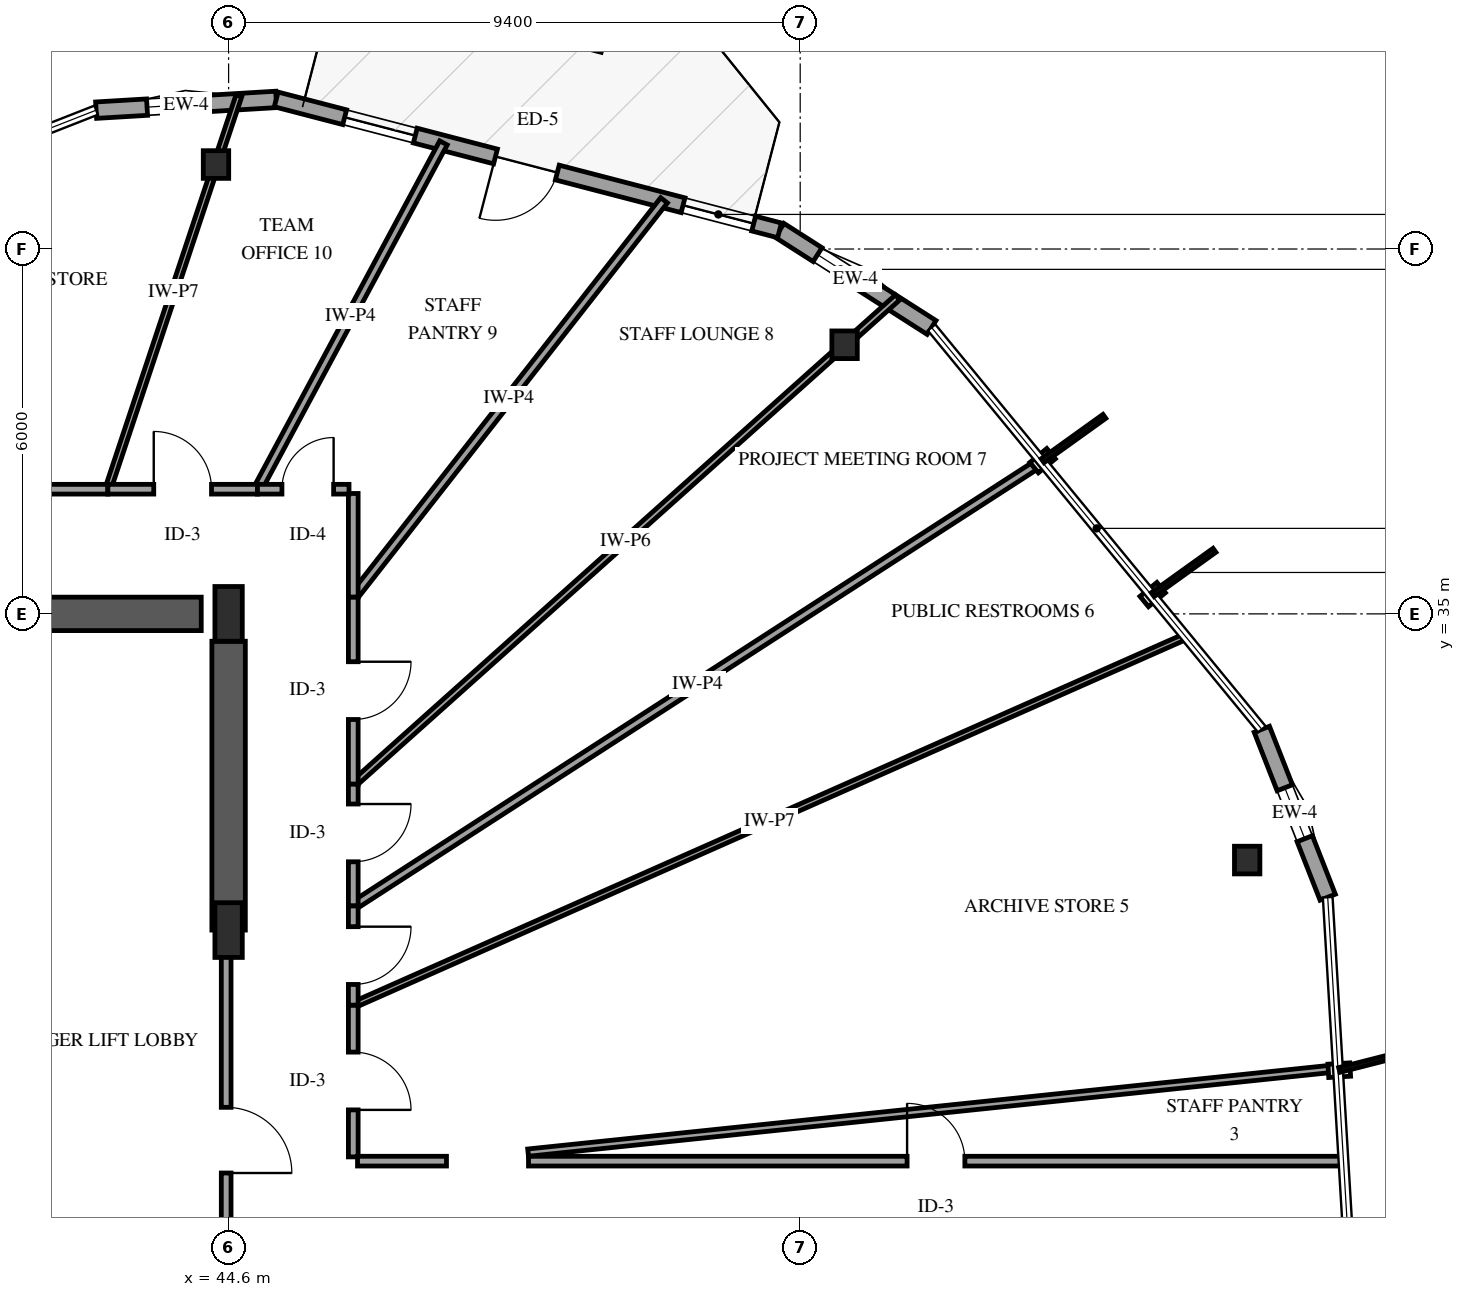
"""IFC4 building model, lengths in metres.
Left out: names, types, materials, properties, quantities, classifications, styles, units other than length and angle.
Written with IfcOpenShell. Run it as: python <this file> out.ifc"""

import sys

from ifc_helpers import new_model, si_unit, direction, frame, frame_2d, origin, origin_2d, place, context, subcontext, project, spatial, rectangle, i_section, extrude, element, fill, save


model = new_model("IFC4")
c1 = context("Model", 3, precision=1e-05, world=origin(), true_north=direction((0.0, 1.0)))
c2 = subcontext(c1, "Body", "Model", "MODEL_VIEW")
j1 = project(units=[si_unit("LENGTHUNIT", "METRE"), si_unit("PLANEANGLEUNIT", "RADIAN")], contexts=[c1])
p1 = place(None, origin())
s1 = spatial("IfcSite", under=j1, at=p1, CompositionType="ELEMENT")
p2 = place(p1, origin())
s2 = spatial("IfcBuilding", under=s1, at=p2, CompositionType="ELEMENT")
p3 = place(p2, frame((0.0, 0.0, 110.8)))
s3 = spatial("IfcBuildingStorey", under=s2, at=p3, CompositionType="ELEMENT", Elevation=110.8)
p4 = place(p3, frame((41.3, 35.0, 0.0), z_axis=(0.0, 0.0, 1.0), x_axis=(1.0, 0.0, 0.0)))
e1 = element("IfcWall", 1, at=p4, inside=s3, PredefinedType="SHEAR", context=c2, shape_type="SweptSolid", body=[
    extrude(rectangle(XDim=2.85, YDim=0.55, at=frame_2d((1.425, 0.0))), origin(), (0.0, 0.0, 1.0), 3.9),
])
p5 = place(p3, frame((44.6, 29.8, 0.0), z_axis=(0.0, 0.0, 1.0), x_axis=(0.0, 1.0, 0.0)))
e2 = element("IfcWall", 2, at=p5, inside=s3, PredefinedType="SHEAR", context=c2, shape_type="SweptSolid", body=[
    extrude(rectangle(XDim=4.75, YDim=0.55, at=frame_2d((2.375, 0.0))), origin(), (0.0, 0.0, 1.0), 3.9),
])
for number, where, z_axis, x_axis in (
    (3, (44.6, 29.8, 0.0), (0.0, 0.0, 1.0), (1.0, 0.0, 0.0)),
    (4, (44.6, 35.0, 0.0), (0.0, 0.0, 1.0), (1.0, 0.0, 0.0)),
):
    element("IfcColumn", number, at=place(p3, frame(where, z_axis=z_axis, x_axis=x_axis)), inside=s3, PredefinedType="PILASTER", context=c2, shape_type="SweptSolid", body=[
        extrude(rectangle(XDim=0.45, YDim=0.9, at=origin_2d()), origin(), (0.0, 0.0, 1.0), 3.9),
    ])
for number, where, z_axis, x_axis in (
    (5, (61.351, 30.951, 0.0), (0.0, 0.0, 1.0), (1.0, 0.0, 0.0)),
    (6, (54.73, 39.425, 0.0), (0.0, 0.0, 1.0), (1.0, 0.0, 0.0)),
    (7, (44.393, 42.389, 0.0), (0.0, 0.0, 1.0), (1.0, 0.0, 0.0)),
):
    element("IfcColumn", number, at=place(p3, frame(where, z_axis=z_axis, x_axis=x_axis)), inside=s3, PredefinedType="COLUMN", context=c2, shape_type="SweptSolid", body=[
        extrude(i_section(OverallWidth=0.418, OverallDepth=0.455, WebThickness=0.042, FlangeThickness=0.068, FilletRadius=0.038, at=origin_2d()), origin(), (0.0, 0.0, 1.0), 3.9),
    ])
p6 = place(p3, frame((56.16, 39.71, 0.0), z_axis=(0.0, 0.0, 1.0), x_axis=(-0.842667219755, 0.538434728404, 0.0)))
e8 = element("IfcWall", 8, at=p6, inside=s3, PredefinedType="SOLIDWALL", context=c2, shape_type="SweptSolid", body=[
    extrude(rectangle(XDim=2.967, YDim=0.27, at=frame_2d((1.483, 0.0))), origin(), (0.0, 0.0, 1.0), 2.979),
])
p7 = place(p6, frame((1.325, 0.0, 0.75)))
e9 = element("IfcOpeningElement", 9, at=p7, cuts=e8, PredefinedType="OPENING", context=c2, shape_type="SweptSolid", body=[
    extrude(rectangle(XDim=0.9, YDim=1.5, at=frame_2d((0.45, 0.75))), frame((0.0, 0.145, 0.0), z_axis=(0.0, -1.0, 0.0), x_axis=(1.0, 0.0, 0.0)), (0.0, 0.0, 1.0), 0.29),
])
p8 = place(p3, frame((45.383, 43.46, 0.0), z_axis=(0.0, 0.0, 1.0), x_axis=(-0.998218594755, -0.059662694245, 0.0)))
e10 = element("IfcWall", 10, at=p8, inside=s3, PredefinedType="SOLIDWALL", context=c2, shape_type="SweptSolid", body=[
    extrude(rectangle(XDim=2.967, YDim=0.27, at=frame_2d((1.483, 0.0))), origin(), (0.0, 0.0, 1.0), 2.979),
])
p9 = place(p8, frame((1.228, 0.0, 0.75)))
e11 = element("IfcOpeningElement", 11, at=p9, cuts=e10, PredefinedType="OPENING", context=c2, shape_type="SweptSolid", body=[
    extrude(rectangle(XDim=0.9, YDim=1.5, at=frame_2d((0.45, 0.75))), frame((0.0, 0.145, 0.0), z_axis=(0.0, -1.0, 0.0), x_axis=(1.0, 0.0, 0.0)), (0.0, 0.0, 1.0), 0.29),
])
p10 = place(p3, frame((53.66, 41.307, 0.0), z_axis=(0.0, 0.0, 1.0), x_axis=(-0.967796780787, 0.251732777164, 0.0)))
e12 = element("IfcWall", 12, at=p10, inside=s3, PredefinedType="SOLIDWALL", context=c2, shape_type="SweptSolid", body=[
    extrude(rectangle(XDim=8.553, YDim=0.25, at=frame_2d((4.276, 0.0))), origin(), (0.0, 0.0, 1.0), 2.979),
])
p11 = place(p10, frame((3.777, 0.0, 0.0)))
e13 = element("IfcOpeningElement", 13, at=p11, cuts=e12, PredefinedType="OPENING", context=c2, shape_type="SweptSolid", body=[
    extrude(rectangle(XDim=1.05, YDim=2.15, at=frame_2d((0.525, 1.075))), frame((0.0, 0.135, 0.0), z_axis=(0.0, -1.0, 0.0), x_axis=(1.0, 0.0, 0.0)), (0.0, 0.0, 1.0), 0.27),
])
p12 = place(p10, frame((0.44, 0.0, 0.72)))
e14 = element("IfcOpeningElement", 14, at=p12, cuts=e12, PredefinedType="OPENING", context=c2, shape_type="SweptSolid", body=[
    extrude(rectangle(XDim=1.2, YDim=1.6, at=frame_2d((0.6, 0.8))), frame((0.0, 0.135, 0.0), z_axis=(0.0, -1.0, 0.0), x_axis=(1.0, 0.0, 0.0)), (0.0, 0.0, 1.0), 0.27),
])
p13 = place(p10, frame((6.19, 0.0, 0.72)))
e15 = element("IfcOpeningElement", 15, at=p13, cuts=e12, PredefinedType="OPENING", context=c2, shape_type="SweptSolid", body=[
    extrude(rectangle(XDim=1.2, YDim=1.6, at=frame_2d((0.6, 0.8))), frame((0.0, 0.135, 0.0), z_axis=(0.0, -1.0, 0.0), x_axis=(1.0, 0.0, 0.0)), (0.0, 0.0, 1.0), 0.27),
])
p14 = place(p3, frame((62.675, 30.341, 0.0), z_axis=(0.0, 0.0, 1.0), x_axis=(-0.365224582411, 0.93091944034, 0.0)))
e16 = element("IfcWall", 16, at=p14, inside=s3, PredefinedType="SOLIDWALL", context=c2, shape_type="SweptSolid", body=[
    extrude(rectangle(XDim=2.967, YDim=0.27, at=frame_2d((1.483, 0.0))), origin(), (0.0, 0.0, 1.0), 2.979),
])
p15 = place(p14, frame((1.033, 0.0, 0.75)))
e17 = element("IfcOpeningElement", 17, at=p15, cuts=e16, PredefinedType="OPENING", context=c2, shape_type="SweptSolid", body=[
    extrude(rectangle(XDim=0.9, YDim=1.5, at=frame_2d((0.45, 0.75))), frame((0.0, 0.145, 0.0), z_axis=(0.0, -1.0, 0.0), x_axis=(1.0, 0.0, 0.0)), (0.0, 0.0, 1.0), 0.29),
])
p16 = place(p3, frame((46.65, 28.566, 0.0), z_axis=(0.0, 0.0, 1.0), x_axis=(0.914344731644, 0.40493667618, 0.0)))
e18 = element("IfcWall", 18, at=p16, inside=s3, PredefinedType="PARTITIONING", context=c2, shape_type="SweptSolid", body=[
    extrude(rectangle(XDim=14.97, YDim=0.1, at=frame_2d((7.485, 0.0))), origin(), (0.0, 0.0, 1.0), 3.6),
])
p17 = place(p3, frame((46.65, 30.197, 0.0), z_axis=(0.0, 0.0, 1.0), x_axis=(0.840088397566, 0.542449522329, 0.0)))
e19 = element("IfcWall", 19, at=p17, inside=s3, PredefinedType="PARTITIONING", context=c2, shape_type="SweptSolid", body=[
    extrude(rectangle(XDim=13.476, YDim=0.14, at=frame_2d((6.738, 0.0))), origin(), (0.0, 0.0, 1.0), 3.6),
])
p18 = place(p3, frame((49.532, 26.0, 0.0), z_axis=(0.0, 0.0, 1.0), x_axis=(1.0, 0.0, 0.0)))
e20 = element("IfcWall", 20, at=p18, inside=s3, PredefinedType="PARTITIONING", context=c2, shape_type="SweptSolid", body=[
    extrude(rectangle(XDim=13.402, YDim=0.16, at=frame_2d((6.701, 0.0))), origin(), (0.0, 0.0, 1.0), 3.6),
])
p19 = place(p18, frame((6.226, 0.0, 0.0)))
e21 = element("IfcOpeningElement", 21, at=p19, cuts=e20, PredefinedType="OPENING", context=c2, shape_type="SweptSolid", body=[
    extrude(rectangle(XDim=0.95, YDim=2.15, at=frame_2d((0.475, 1.075))), frame((0.0, 0.09, 0.0), z_axis=(0.0, -1.0, 0.0), x_axis=(1.0, 0.0, 0.0)), (0.0, 0.0, 1.0), 0.18),
])
p20 = place(p3, frame((49.525, 26.14, 0.0), z_axis=(0.0, 0.0, 1.0), x_axis=(0.994604112438, 0.103743238433, 0.0)))
e22 = element("IfcWall", 22, at=p20, inside=s3, PredefinedType="PARTITIONING", context=c2, shape_type="SweptSolid", body=[
    extrude(rectangle(XDim=13.39, YDim=0.12, at=frame_2d((6.695, 0.0))), origin(), (0.0, 0.0, 1.0), 3.6),
])
p21 = place(p3, frame((46.65, 32.199, 0.0), z_axis=(0.0, 0.0, 1.0), x_axis=(0.745394943762, 0.666623115272, 0.0)))
e23 = element("IfcWall", 23, at=p21, inside=s3, PredefinedType="PARTITIONING", context=c2, shape_type="SweptSolid", body=[
    extrude(rectangle(XDim=12.01, YDim=0.11, at=frame_2d((6.005, 0.0))), origin(), (0.0, 0.0, 1.0), 2.978),
])
p22 = place(p3, frame((46.65, 35.277, 0.0), z_axis=(0.0, 0.0, 1.0), x_axis=(0.616712482875, 0.78718848662, 0.0)))
e24 = element("IfcWall", 24, at=p22, inside=s3, PredefinedType="PARTITIONING", context=c2, shape_type="SweptSolid", body=[
    extrude(rectangle(XDim=8.288, YDim=0.14, at=frame_2d((4.144, 0.0))), origin(), (0.0, 0.0, 1.0), 2.978),
])
p23 = place(p3, frame((44.56, 29.8, 0.0), z_axis=(0.0, 0.0, 1.0), x_axis=(0.0, -1.0, 0.0)))
e25 = element("IfcWall", 25, at=p23, inside=s3, PredefinedType="PARTITIONING", context=c2, shape_type="SweptSolid", body=[
    extrude(rectangle(XDim=6.91, YDim=0.16, at=frame_2d((3.455, 0.0))), origin(), (0.0, 0.0, 1.0), 2.64),
])
p24 = place(p23, frame((2.915, 0.0, 0.0)))
e26 = element("IfcOpeningElement", 26, at=p24, cuts=e25, PredefinedType="OPENING", context=c2, shape_type="SweptSolid", body=[
    extrude(rectangle(XDim=1.08, YDim=2.15, at=frame_2d((0.54, 1.075))), frame((0.0, 0.09, 0.0), z_axis=(0.0, -1.0, 0.0), x_axis=(1.0, 0.0, 0.0)), (0.0, 0.0, 1.0), 0.18),
])
p25 = place(p3, frame((42.614, 37.05, 0.0), z_axis=(0.0, 0.0, 1.0), x_axis=(0.316012953592, 0.948754875172, 0.0)))
e27 = element("IfcWall", 27, at=p25, inside=s3, PredefinedType="PARTITIONING", context=c2, shape_type="SweptSolid", body=[
    extrude(rectangle(XDim=6.819, YDim=0.1, at=frame_2d((3.41, 0.0))), origin(), (0.0, 0.0, 1.0), 2.895),
])
p26 = place(p3, frame((45.074, 37.05, 0.0), z_axis=(0.0, 0.0, 1.0), x_axis=(0.473201001123, 0.880954489481, 0.0)))
e28 = element("IfcWall", 28, at=p26, inside=s3, PredefinedType="PARTITIONING", context=c2, shape_type="SweptSolid", body=[
    extrude(rectangle(XDim=6.465, YDim=0.14, at=frame_2d((3.232, 0.0))), origin(), (0.0, 0.0, 1.0), 2.974),
])
p27 = place(p3, frame((38.324, 37.05, 0.0), z_axis=(0.0, 0.0, 1.0), x_axis=(1.0, 0.0, 0.0)))
e29 = element("IfcWall", 29, at=p27, inside=s3, PredefinedType="PARTITIONING", context=c2, shape_type="SweptSolid", body=[
    extrude(rectangle(XDim=4.29, YDim=0.16, at=frame_2d((2.145, 0.0))), origin(), (0.0, 0.0, 1.0), 3.6),
])
p28 = place(p27, frame((1.67, 0.0, 0.0)))
e30 = element("IfcOpeningElement", 30, at=p28, cuts=e29, PredefinedType="OPENING", context=c2, shape_type="SweptSolid", body=[
    extrude(rectangle(XDim=0.95, YDim=2.15, at=frame_2d((0.475, 1.075))), frame((0.0, 0.09, 0.0), z_axis=(0.0, -1.0, 0.0), x_axis=(1.0, 0.0, 0.0)), (0.0, 0.0, 1.0), 0.18),
])
p29 = place(p3, frame((46.65, 35.277, 0.0), z_axis=(0.0, 0.0, 1.0), x_axis=(0.0, -1.0, 0.0)))
e31 = element("IfcWall", 31, at=p29, inside=s3, PredefinedType="PARTITIONING", context=c2, shape_type="SweptSolid", body=[
    extrude(rectangle(XDim=3.078, YDim=0.16, at=frame_2d((1.539, 0.0))), origin(), (0.0, 0.0, 1.0), 3.6),
])
p30 = place(p29, frame((1.064, 0.0, 0.0)))
e32 = element("IfcOpeningElement", 32, at=p30, cuts=e31, PredefinedType="OPENING", context=c2, shape_type="SweptSolid", body=[
    extrude(rectangle(XDim=0.95, YDim=2.15, at=frame_2d((0.475, 1.075))), frame((0.0, 0.09, 0.0), z_axis=(0.0, -1.0, 0.0), x_axis=(1.0, 0.0, 0.0)), (0.0, 0.0, 1.0), 0.18),
])
p31 = place(p3, frame((46.65, 28.566, 0.0), z_axis=(0.0, 0.0, 1.0), x_axis=(0.0, -1.0, 0.0)))
e33 = element("IfcWall", 33, at=p31, inside=s3, PredefinedType="PARTITIONING", context=c2, shape_type="SweptSolid", body=[
    extrude(rectangle(XDim=2.496, YDim=0.16, at=frame_2d((1.248, 0.0))), origin(), (0.0, 0.0, 1.0), 3.6),
])
p32 = place(p31, frame((0.773, 0.0, 0.0)))
e34 = element("IfcOpeningElement", 34, at=p32, cuts=e33, PredefinedType="OPENING", context=c2, shape_type="SweptSolid", body=[
    extrude(rectangle(XDim=0.95, YDim=2.15, at=frame_2d((0.475, 1.075))), frame((0.0, 0.09, 0.0), z_axis=(0.0, -1.0, 0.0), x_axis=(1.0, 0.0, 0.0)), (0.0, 0.0, 1.0), 0.18),
])
p33 = place(p3, frame((42.614, 37.05, 0.0), z_axis=(0.0, 0.0, 1.0), x_axis=(1.0, 0.0, 0.0)))
e35 = element("IfcWall", 35, at=p33, inside=s3, PredefinedType="PARTITIONING", context=c2, shape_type="SweptSolid", body=[
    extrude(rectangle(XDim=2.46, YDim=0.16, at=frame_2d((1.23, 0.0))), origin(), (0.0, 0.0, 1.0), 3.6),
])
p34 = place(p33, frame((0.755, 0.0, 0.0)))
e36 = element("IfcOpeningElement", 36, at=p34, cuts=e35, PredefinedType="OPENING", context=c2, shape_type="SweptSolid", body=[
    extrude(rectangle(XDim=0.95, YDim=2.15, at=frame_2d((0.475, 1.075))), frame((0.0, 0.09, 0.0), z_axis=(0.0, -1.0, 0.0), x_axis=(1.0, 0.0, 0.0)), (0.0, 0.0, 1.0), 0.18),
])
p35 = place(p3, frame((46.65, 32.199, 0.0), z_axis=(0.0, 0.0, 1.0), x_axis=(0.0, -1.0, 0.0)))
e37 = element("IfcWall", 37, at=p35, inside=s3, PredefinedType="PARTITIONING", context=c2, shape_type="SweptSolid", body=[
    extrude(rectangle(XDim=2.002, YDim=0.16, at=frame_2d((1.001, 0.0))), origin(), (0.0, 0.0, 1.0), 3.6),
])
p36 = place(p35, frame((0.326, 0.0, 0.0)))
e38 = element("IfcOpeningElement", 38, at=p36, cuts=e37, PredefinedType="OPENING", context=c2, shape_type="SweptSolid", body=[
    extrude(rectangle(XDim=0.95, YDim=2.15, at=frame_2d((0.475, 1.075))), frame((0.0, 0.09, 0.0), z_axis=(0.0, -1.0, 0.0), x_axis=(1.0, 0.0, 0.0)), (0.0, 0.0, 1.0), 0.18),
])
p37 = place(p3, frame((46.65, 36.98, 0.0), z_axis=(0.0, 0.0, 1.0), x_axis=(0.0, -1.0, 0.0)))
e39 = element("IfcWall", 39, at=p37, inside=s3, PredefinedType="PARTITIONING", context=c2, shape_type="SweptSolid", body=[
    extrude(rectangle(XDim=1.703, YDim=0.16, at=frame_2d((0.852, 0.0))), origin(), (0.0, 0.0, 1.0), 3.6),
])
p38 = place(p3, frame((46.65, 30.197, 0.0), z_axis=(0.0, 0.0, 1.0), x_axis=(0.0, -1.0, 0.0)))
e40 = element("IfcWall", 40, at=p38, inside=s3, PredefinedType="PARTITIONING", context=c2, shape_type="SweptSolid", body=[
    extrude(rectangle(XDim=1.631, YDim=0.16, at=frame_2d((0.815, 0.0))), origin(), (0.0, 0.0, 1.0), 3.6),
])
p39 = place(p38, frame((0.341, 0.0, 0.0)))
e41 = element("IfcOpeningElement", 41, at=p39, cuts=e40, PredefinedType="OPENING", context=c2, shape_type="SweptSolid", body=[
    extrude(rectangle(XDim=0.95, YDim=2.15, at=frame_2d((0.475, 1.075))), frame((0.0, 0.09, 0.0), z_axis=(0.0, -1.0, 0.0), x_axis=(1.0, 0.0, 0.0)), (0.0, 0.0, 1.0), 0.18),
])
p40 = place(p3, frame((45.074, 37.05, 0.0), z_axis=(0.0, 0.0, 1.0), x_axis=(1.0, 0.0, 0.0)))
e42 = element("IfcWall", 42, at=p40, inside=s3, PredefinedType="PARTITIONING", context=c2, shape_type="SweptSolid", body=[
    extrude(rectangle(XDim=1.506, YDim=0.16, at=frame_2d((0.753, 0.0))), origin(), (0.0, 0.0, 1.0), 3.6),
])
p41 = place(p40, frame((0.403, 0.0, 0.0)))
e43 = element("IfcOpeningElement", 43, at=p41, cuts=e42, PredefinedType="OPENING", context=c2, shape_type="SweptSolid", body=[
    extrude(rectangle(XDim=0.85, YDim=2.1, at=frame_2d((0.425, 1.05))), frame((0.0, 0.09, 0.0), z_axis=(0.0, -1.0, 0.0), x_axis=(1.0, 0.0, 0.0)), (0.0, 0.0, 1.0), 0.18),
])
p42 = place(p3, frame((46.72, 26.0, 0.0), z_axis=(0.0, 0.0, 1.0), x_axis=(1.0, 0.0, 0.0)))
e44 = element("IfcWall", 44, at=p42, inside=s3, PredefinedType="PARTITIONING", context=c2, shape_type="SweptSolid", body=[
    extrude(rectangle(XDim=1.463, YDim=0.16, at=frame_2d((0.731, 0.0))), origin(), (0.0, 0.0, 1.0), 3.6),
])
p43 = place(p7, origin())
e45 = element("IfcWindow", 45, at=p43, inside=s3, PartitioningType="SINGLE_PANEL", PredefinedType="WINDOW", context=c2, shape_type="SweptSolid", body=[
    extrude(rectangle(XDim=0.9, YDim=1.5, at=frame_2d((0.45, 0.75))), frame((0.0, 0.03, 0.0), z_axis=(0.0, -1.0, 0.0), x_axis=(1.0, 0.0, 0.0)), (0.0, 0.0, 1.0), 0.06),
])
fill(e9, e45)
p44 = place(p9, origin())
e46 = element("IfcWindow", 46, at=p44, inside=s3, PartitioningType="SINGLE_PANEL", PredefinedType="WINDOW", context=c2, shape_type="SweptSolid", body=[
    extrude(rectangle(XDim=0.9, YDim=1.5, at=frame_2d((0.45, 0.75))), frame((0.0, 0.03, 0.0), z_axis=(0.0, -1.0, 0.0), x_axis=(1.0, 0.0, 0.0)), (0.0, 0.0, 1.0), 0.06),
])
fill(e11, e46)
p45 = place(p11, origin())
e47 = element("IfcDoor", 47, at=p45, inside=s3, OperationType="SINGLE_SWING_RIGHT", PredefinedType="DOOR", context=c2, shape_type="SweptSolid", body=[
    extrude(rectangle(XDim=1.05, YDim=2.15, at=frame_2d((0.525, 1.075))), frame((0.0, 0.025, 0.0), z_axis=(0.0, -1.0, 0.0), x_axis=(1.0, 0.0, 0.0)), (0.0, 0.0, 1.0), 0.05),
])
fill(e13, e47)
p46 = place(p12, origin())
e48 = element("IfcWindow", 48, at=p46, inside=s3, PartitioningType="SINGLE_PANEL", PredefinedType="WINDOW", context=c2, shape_type="SweptSolid", body=[
    extrude(rectangle(XDim=1.2, YDim=1.6, at=frame_2d((0.6, 0.8))), frame((0.0, 0.03, 0.0), z_axis=(0.0, -1.0, 0.0), x_axis=(1.0, 0.0, 0.0)), (0.0, 0.0, 1.0), 0.06),
])
fill(e14, e48)
p47 = place(p13, origin())
e49 = element("IfcWindow", 49, at=p47, inside=s3, PartitioningType="SINGLE_PANEL", PredefinedType="WINDOW", context=c2, shape_type="SweptSolid", body=[
    extrude(rectangle(XDim=1.2, YDim=1.6, at=frame_2d((0.6, 0.8))), frame((0.0, 0.03, 0.0), z_axis=(0.0, -1.0, 0.0), x_axis=(1.0, 0.0, 0.0)), (0.0, 0.0, 1.0), 0.06),
])
fill(e15, e49)
p48 = place(p15, origin())
e50 = element("IfcWindow", 50, at=p48, inside=s3, PartitioningType="SINGLE_PANEL", PredefinedType="WINDOW", context=c2, shape_type="SweptSolid", body=[
    extrude(rectangle(XDim=0.9, YDim=1.5, at=frame_2d((0.45, 0.75))), frame((0.0, 0.03, 0.0), z_axis=(0.0, -1.0, 0.0), x_axis=(1.0, 0.0, 0.0)), (0.0, 0.0, 1.0), 0.06),
])
fill(e17, e50)
p49 = place(p19, origin())
e51 = element("IfcDoor", 51, at=p49, inside=s3, OperationType="SINGLE_SWING_LEFT", PredefinedType="DOOR", context=c2, shape_type="SweptSolid", body=[
    extrude(rectangle(XDim=0.95, YDim=2.15, at=frame_2d((0.475, 1.075))), frame((0.0, 0.025, 0.0), z_axis=(0.0, -1.0, 0.0), x_axis=(1.0, 0.0, 0.0)), (0.0, 0.0, 1.0), 0.05),
])
fill(e21, e51)
p50 = place(p24, origin())
e52 = element("IfcDoor", 52, at=p50, inside=s3, OperationType="SINGLE_SWING_RIGHT", PredefinedType="DOOR", context=c2, shape_type="SweptSolid", body=[
    extrude(rectangle(XDim=1.08, YDim=2.15, at=frame_2d((0.54, 1.075))), frame((0.0, 0.025, 0.0), z_axis=(0.0, -1.0, 0.0), x_axis=(1.0, 0.0, 0.0)), (0.0, 0.0, 1.0), 0.05),
])
fill(e26, e52)
p51 = place(p30, origin())
e53 = element("IfcDoor", 53, at=p51, inside=s3, OperationType="SINGLE_SWING_LEFT", PredefinedType="DOOR", context=c2, shape_type="SweptSolid", body=[
    extrude(rectangle(XDim=0.95, YDim=2.15, at=frame_2d((0.475, 1.075))), frame((0.0, 0.025, 0.0), z_axis=(0.0, -1.0, 0.0), x_axis=(1.0, 0.0, 0.0)), (0.0, 0.0, 1.0), 0.05),
])
fill(e32, e53)
p52 = place(p32, origin())
e54 = element("IfcDoor", 54, at=p52, inside=s3, OperationType="SINGLE_SWING_RIGHT", PredefinedType="DOOR", context=c2, shape_type="SweptSolid", body=[
    extrude(rectangle(XDim=0.95, YDim=2.15, at=frame_2d((0.475, 1.075))), frame((0.0, 0.025, 0.0), z_axis=(0.0, -1.0, 0.0), x_axis=(1.0, 0.0, 0.0)), (0.0, 0.0, 1.0), 0.05),
])
fill(e34, e54)
p53 = place(p34, origin())
e55 = element("IfcDoor", 55, at=p53, inside=s3, OperationType="SINGLE_SWING_LEFT", PredefinedType="DOOR", context=c2, shape_type="SweptSolid", body=[
    extrude(rectangle(XDim=0.95, YDim=2.15, at=frame_2d((0.475, 1.075))), frame((0.0, 0.025, 0.0), z_axis=(0.0, -1.0, 0.0), x_axis=(1.0, 0.0, 0.0)), (0.0, 0.0, 1.0), 0.05),
])
fill(e36, e55)
p54 = place(p36, origin())
e56 = element("IfcDoor", 56, at=p54, inside=s3, OperationType="SINGLE_SWING_LEFT", PredefinedType="DOOR", context=c2, shape_type="SweptSolid", body=[
    extrude(rectangle(XDim=0.95, YDim=2.15, at=frame_2d((0.475, 1.075))), frame((0.0, 0.025, 0.0), z_axis=(0.0, -1.0, 0.0), x_axis=(1.0, 0.0, 0.0)), (0.0, 0.0, 1.0), 0.05),
])
fill(e38, e56)
p55 = place(p39, origin())
e57 = element("IfcDoor", 57, at=p55, inside=s3, OperationType="SINGLE_SWING_LEFT", PredefinedType="DOOR", context=c2, shape_type="SweptSolid", body=[
    extrude(rectangle(XDim=0.95, YDim=2.15, at=frame_2d((0.475, 1.075))), frame((0.0, 0.025, 0.0), z_axis=(0.0, -1.0, 0.0), x_axis=(1.0, 0.0, 0.0)), (0.0, 0.0, 1.0), 0.05),
])
fill(e41, e57)
p56 = place(p41, origin())
e58 = element("IfcDoor", 58, at=p56, inside=s3, OperationType="SINGLE_SWING_RIGHT", PredefinedType="DOOR", context=c2, shape_type="SweptSolid", body=[
    extrude(rectangle(XDim=0.85, YDim=2.1, at=frame_2d((0.425, 1.05))), frame((0.0, 0.025, 0.0), z_axis=(0.0, -1.0, 0.0), x_axis=(1.0, 0.0, 0.0)), (0.0, 0.0, 1.0), 0.05),
])
fill(e43, e58)
save(model, sys.argv[1])
